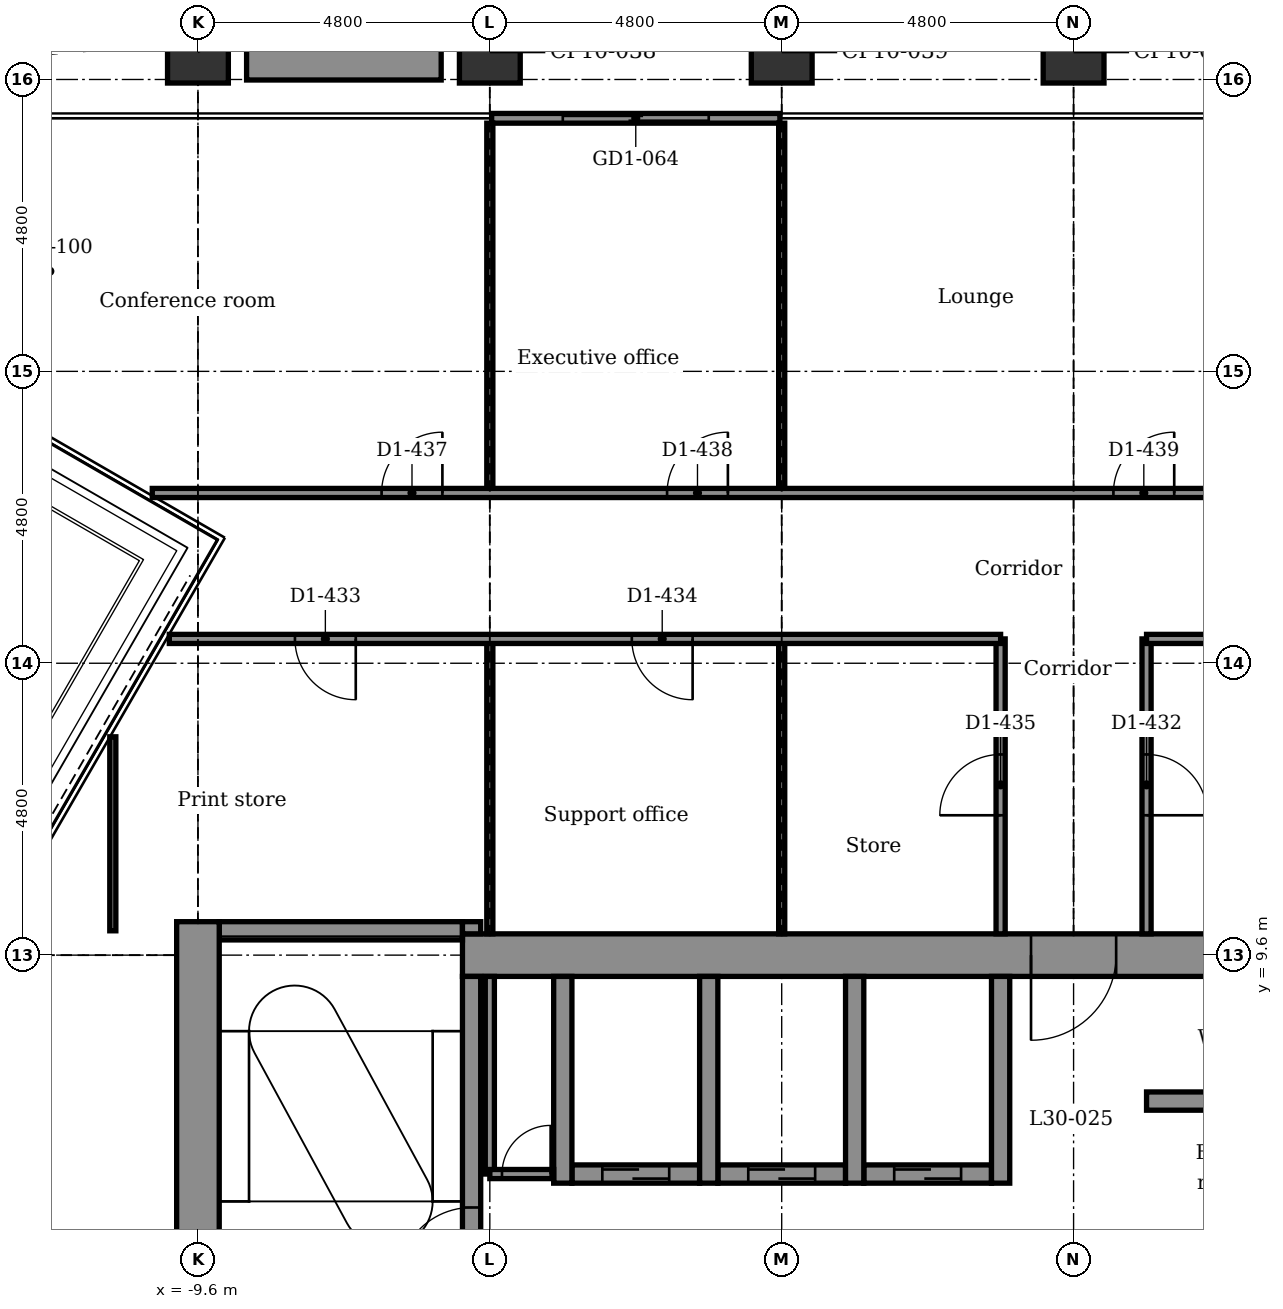
"""IFC4 building model, lengths in metres.
Left out: names, types, materials, properties, quantities, classifications, styles, units other than length and angle.
Written with IfcOpenShell. Run it as: python <this file> out.ifc"""

import sys

from ifc_helpers import new_model, si_unit, direction, frame, frame_2d, origin, origin_2d, place, context, subcontext, project, spatial, rectangle, extrude, element, fill, save


model = new_model("IFC4")
c1 = context("Model", 3, precision=1e-05, world=origin(), true_north=direction((0.0, 1.0)))
c2 = subcontext(c1, "Body", "Model", "MODEL_VIEW")
j1 = project(units=[si_unit("LENGTHUNIT", "METRE"), si_unit("PLANEANGLEUNIT", "RADIAN")], contexts=[c1])
p1 = place(None, origin())
s1 = spatial("IfcSite", under=j1, at=p1, CompositionType="ELEMENT")
p2 = place(p1, origin())
s2 = spatial("IfcBuilding", under=s1, at=p2, CompositionType="ELEMENT")
p3 = place(p2, frame((0.0, 0.0, 150.5)))
s3 = spatial("IfcBuildingStorey", under=s2, at=p3, CompositionType="ELEMENT", Elevation=150.5)
for number, where, z_axis, x_axis in (
    (1, (-9.6, 24.442, -0.15), (0.0, 0.0, 1.0), (1.0, 0.0, 0.0)),
    (2, (-4.8, 24.442, -0.15), (0.0, 0.0, 1.0), (1.0, 0.0, 0.0)),
    (3, (0.0, 24.442, -0.15), (0.0, 0.0, 1.0), (1.0, 0.0, 0.0)),
    (4, (4.8, 24.442, -0.15), (0.0, 0.0, 1.0), (1.0, 0.0, 0.0)),
):
    element("IfcColumn", number, at=place(p3, frame(where, z_axis=z_axis, x_axis=x_axis)), inside=s3, PredefinedType="COLUMN", context=c2, shape_type="SweptSolid", body=[
        extrude(rectangle(XDim=1.0, YDim=1.0, at=origin_2d()), origin(), (0.0, 0.0, 1.0), 3.9),
    ])
p4 = place(p3, frame((-3.45, 6.0, -0.15), z_axis=(0.0, 0.0, 1.0), x_axis=(1.0, 0.0, 0.0)))
e5 = element("IfcWall", 5, at=p4, inside=s3, PredefinedType="STANDARD", context=c2, shape_type="SweptSolid", body=[
    extrude(rectangle(XDim=2.1, YDim=0.3, at=frame_2d((1.05, 0.0))), origin(), (0.0, 0.0, 1.0), 3.9),
])
p5 = place(p4, frame((0.5, 0.0, 0.15)))
e6 = element("IfcOpeningElement", 6, at=p5, cuts=e5, PredefinedType="OPENING", context=c2, shape_type="SweptSolid", body=[
    extrude(rectangle(XDim=1.1, YDim=2.1, at=frame_2d((0.55, 1.05))), frame((0.0, 0.16, 0.0), z_axis=(0.0, -1.0, 0.0), x_axis=(1.0, 0.0, 0.0)), (0.0, 0.0, 1.0), 0.32),
])
p6 = place(p3, frame((-1.05, 6.0, -0.15), z_axis=(0.0, 0.0, 1.0), x_axis=(1.0, 0.0, 0.0)))
e7 = element("IfcWall", 7, at=p6, inside=s3, PredefinedType="STANDARD", context=c2, shape_type="SweptSolid", body=[
    extrude(rectangle(XDim=2.1, YDim=0.3, at=frame_2d((1.05, 0.0))), origin(), (0.0, 0.0, 1.0), 3.9),
])
p7 = place(p6, frame((0.5, 0.0, 0.15)))
e8 = element("IfcOpeningElement", 8, at=p7, cuts=e7, PredefinedType="OPENING", context=c2, shape_type="SweptSolid", body=[
    extrude(rectangle(XDim=1.1, YDim=2.1, at=frame_2d((0.55, 1.05))), frame((0.0, 0.16, 0.0), z_axis=(0.0, -1.0, 0.0), x_axis=(1.0, 0.0, 0.0)), (0.0, 0.0, 1.0), 0.32),
])
p8 = place(p3, frame((1.35, 6.0, -0.15), z_axis=(0.0, 0.0, 1.0), x_axis=(1.0, 0.0, 0.0)))
e9 = element("IfcWall", 9, at=p8, inside=s3, PredefinedType="STANDARD", context=c2, shape_type="SweptSolid", body=[
    extrude(rectangle(XDim=2.1, YDim=0.3, at=frame_2d((1.05, 0.0))), origin(), (0.0, 0.0, 1.0), 3.9),
])
p9 = place(p8, frame((0.5, 0.0, 0.15)))
e10 = element("IfcOpeningElement", 10, at=p9, cuts=e9, PredefinedType="OPENING", context=c2, shape_type="SweptSolid", body=[
    extrude(rectangle(XDim=1.1, YDim=2.1, at=frame_2d((0.55, 1.05))), frame((0.0, 0.16, 0.0), z_axis=(0.0, -1.0, 0.0), x_axis=(1.0, 0.0, 0.0)), (0.0, 0.0, 1.0), 0.32),
])
p10 = place(p3, frame((6.0, 7.2, -0.15), z_axis=(0.0, 0.0, 1.0), x_axis=(1.0, 0.0, 0.0)))
e11 = element("IfcWall", 11, at=p10, inside=s3, PredefinedType="STANDARD", context=c2, shape_type="SweptSolid", body=[
    extrude(rectangle(XDim=3.25, YDim=0.3, at=frame_2d((1.625, 0.0))), origin(), (0.0, 0.0, 1.0), 3.9),
])
p11 = place(p3, frame((-5.25, 9.6, -0.15), z_axis=(0.0, 0.0, 1.0), x_axis=(1.0, 0.0, 0.0)))
e12 = element("IfcWall", 12, at=p11, inside=s3, PredefinedType="SHEAR", context=c2, shape_type="SweptSolid", body=[
    extrude(rectangle(XDim=14.5, YDim=0.7, at=frame_2d((7.25, 0.0))), origin(), (0.0, 0.0, 1.0), 3.9),
])
p12 = place(p11, frame((9.35, 0.0, 0.15)))
e13 = element("IfcOpeningElement", 13, at=p12, cuts=e12, PredefinedType="OPENING", context=c2, shape_type="SweptSolid", body=[
    extrude(rectangle(XDim=1.4, YDim=2.1, at=frame_2d((0.7, 1.05))), frame((0.0, 0.36, 0.0), z_axis=(0.0, -1.0, 0.0), x_axis=(1.0, 0.0, 0.0)), (0.0, 0.0, 1.0), 0.72),
])
p13 = place(p3, frame((-9.25, 10.0, -0.15), z_axis=(0.0, 0.0, 1.0), x_axis=(1.0, 0.0, 0.0)))
e14 = element("IfcWall", 14, at=p13, inside=s3, PredefinedType="STANDARD", context=c2, shape_type="SweptSolid", body=[
    extrude(rectangle(XDim=4.0, YDim=0.3, at=frame_2d((2.0, 0.0))), origin(), (0.0, 0.0, 1.0), 3.9),
])
p14 = place(p3, frame((-9.6, 2.55, -0.15), z_axis=(0.0, 0.0, 1.0), x_axis=(0.0, 1.0, 0.0)))
e15 = element("IfcWall", 15, at=p14, inside=s3, PredefinedType="SHEAR", context=c2, shape_type="SweptSolid", body=[
    extrude(rectangle(XDim=7.6, YDim=0.7, at=frame_2d((3.8, 0.0))), origin(), (0.0, 0.0, 1.0), 3.9),
])
p15 = place(p3, frame((-5.1, 2.25, -0.15), z_axis=(0.0, 0.0, 1.0), x_axis=(0.0, 1.0, 0.0)))
e16 = element("IfcWall", 16, at=p15, inside=s3, PredefinedType="STANDARD", context=c2, shape_type="SweptSolid", body=[
    extrude(rectangle(XDim=7.0, YDim=0.3, at=frame_2d((3.5, 0.0))), origin(), (0.0, 0.0, 1.0), 3.9),
])
p16 = place(p15, frame((2.0, 0.0, 0.15)))
e17 = element("IfcOpeningElement", 17, at=p16, cuts=e16, PredefinedType="OPENING", context=c2, shape_type="SweptSolid", body=[
    extrude(rectangle(XDim=1.2, YDim=2.1, at=frame_2d((0.6, 1.05))), frame((0.0, 0.16, 0.0), z_axis=(0.0, -1.0, 0.0), x_axis=(1.0, 0.0, 0.0)), (0.0, 0.0, 1.0), 0.32),
])
p17 = place(p3, frame((-5.1, 9.95, -0.15), z_axis=(0.0, 0.0, 1.0), x_axis=(0.0, 1.0, 0.0)))
e18 = element("IfcWall", 18, at=p17, inside=s3, PredefinedType="STANDARD", context=c2, shape_type="SweptSolid", body=[
    extrude(rectangle(XDim=0.2, YDim=0.3, at=frame_2d((0.1, 0.0))), origin(), (0.0, 0.0, 1.0), 3.9),
])
for number, where, z_axis, x_axis in (
    (19, (-3.6, 5.85, -0.15), (0.0, 0.0, 1.0), (0.0, 1.0, 0.0)),
    (20, (-1.2, 5.85, -0.15), (0.0, 0.0, 1.0), (0.0, 1.0, 0.0)),
    (21, (1.2, 5.85, -0.15), (0.0, 0.0, 1.0), (0.0, 1.0, 0.0)),
    (22, (3.6, 5.85, -0.15), (0.0, 0.0, 1.0), (0.0, 1.0, 0.0)),
):
    element("IfcWall", number, at=place(p3, frame(where, z_axis=z_axis, x_axis=x_axis)), inside=s3, PredefinedType="STANDARD", context=c2, shape_type="SweptSolid", body=[
        extrude(rectangle(XDim=3.4, YDim=0.3, at=frame_2d((1.7, 0.0))), origin(), (0.0, 0.0, 1.0), 3.9),
    ])
p18 = place(p3, frame((-4.77, 23.362, 0.0), z_axis=(0.0, 0.0, 1.0), x_axis=(1.0, 0.0, 0.0)))
e23 = element("IfcWall", 23, at=p18, inside=s3, PredefinedType="PARTITIONING", context=c2, shape_type="SweptSolid", body=[
    extrude(rectangle(XDim=4.74, YDim=0.16, at=frame_2d((2.37, 0.0))), origin(), (0.0, 0.0, 1.0), 3.75),
])
p19 = place(p18, frame((1.17, 0.0, 0.0)))
e24 = element("IfcOpeningElement", 24, at=p19, cuts=e23, PredefinedType="OPENING", context=c2, shape_type="SweptSolid", body=[
    extrude(rectangle(XDim=2.4, YDim=2.4, at=frame_2d((1.2, 1.2))), frame((0.0, 0.09, 0.0), z_axis=(0.0, -1.0, 0.0), x_axis=(1.0, 0.0, 0.0)), (0.0, 0.0, 1.0), 0.18),
])
p20 = place(p3, frame((-8.8, 24.292, 0.0), z_axis=(0.0, 0.0, 1.0), x_axis=(1.0, 0.0, 0.0)))
e25 = element("IfcWall", 25, at=p20, inside=s3, PredefinedType="USERDEFINED", context=c2, shape_type="SweptSolid", body=[
    extrude(rectangle(XDim=3.2, YDim=0.6, at=frame_2d((1.6, 0.0))), origin(), (0.0, 0.0, 1.0), 0.7),
])
p21 = place(p3, frame((6.0, 9.95, 0.0), z_axis=(0.0, 0.0, 1.0), x_axis=(0.0, 1.0, 0.0)))
e26 = element("IfcWall", 26, at=p21, inside=s3, PredefinedType="PARTITIONING", context=c2, shape_type="SweptSolid", body=[
    extrude(rectangle(XDim=4.85, YDim=0.15, at=frame_2d((2.425, 0.0))), origin(), (0.0, 0.0, 1.0), 3.75),
])
p22 = place(p21, frame((1.95, 0.0, 0.0)))
e27 = element("IfcOpeningElement", 27, at=p22, cuts=e26, PredefinedType="OPENING", context=c2, shape_type="SweptSolid", body=[
    extrude(rectangle(XDim=1.0, YDim=2.1, at=frame_2d((0.5, 1.05))), frame((0.0, 0.085, 0.0), z_axis=(0.0, -1.0, 0.0), x_axis=(1.0, 0.0, 0.0)), (0.0, 0.0, 1.0), 0.17),
])
p23 = place(p3, frame((3.6, 9.95, 0.0), z_axis=(0.0, 0.0, 1.0), x_axis=(0.0, 1.0, 0.0)))
e28 = element("IfcWall", 28, at=p23, inside=s3, PredefinedType="PARTITIONING", context=c2, shape_type="SweptSolid", body=[
    extrude(rectangle(XDim=4.85, YDim=0.15, at=frame_2d((2.425, 0.0))), origin(), (0.0, 0.0, 1.0), 3.75),
])
p24 = place(p23, frame((1.95, 0.0, 0.0)))
e29 = element("IfcOpeningElement", 29, at=p24, cuts=e28, PredefinedType="OPENING", context=c2, shape_type="SweptSolid", body=[
    extrude(rectangle(XDim=1.0, YDim=2.1, at=frame_2d((0.5, 1.05))), frame((0.0, 0.085, 0.0), z_axis=(0.0, -1.0, 0.0), x_axis=(1.0, 0.0, 0.0)), (0.0, 0.0, 1.0), 0.17),
])
p25 = place(p3, frame((0.0, 9.95, 0.0), z_axis=(0.0, 0.0, 1.0), x_axis=(0.0, 1.0, 0.0)))
e30 = element("IfcWall", 30, at=p25, inside=s3, PredefinedType="PARTITIONING", context=c2, shape_type="SweptSolid", body=[
    extrude(rectangle(XDim=4.85, YDim=0.1, at=frame_2d((2.425, 0.0))), origin(), (0.0, 0.0, 1.0), 3.066),
])
p26 = place(p3, frame((0.0, 17.2, 0.0), z_axis=(0.0, 0.0, 1.0), x_axis=(0.0, 1.0, 0.0)))
e31 = element("IfcWall", 31, at=p26, inside=s3, PredefinedType="PARTITIONING", context=c2, shape_type="SweptSolid", body=[
    extrude(rectangle(XDim=6.082, YDim=0.1, at=frame_2d((3.041, 0.0))), origin(), (0.0, 0.0, 1.0), 3.066),
])
p27 = place(p3, frame((-4.8, 9.95, 0.0), z_axis=(0.0, 0.0, 1.0), x_axis=(0.0, 1.0, 0.0)))
e32 = element("IfcWall", 32, at=p27, inside=s3, PredefinedType="PARTITIONING", context=c2, shape_type="SweptSolid", body=[
    extrude(rectangle(XDim=4.85, YDim=0.1, at=frame_2d((2.425, 0.0))), origin(), (0.0, 0.0, 1.0), 3.066),
])
p28 = place(p3, frame((-4.8, 17.2, 0.0), z_axis=(0.0, 0.0, 1.0), x_axis=(0.0, 1.0, 0.0)))
e33 = element("IfcWall", 33, at=p28, inside=s3, PredefinedType="PARTITIONING", context=c2, shape_type="SweptSolid", body=[
    extrude(rectangle(XDim=6.082, YDim=0.1, at=frame_2d((3.041, 0.0))), origin(), (0.0, 0.0, 1.0), 3.066),
])
p29 = place(p3, frame((-4.8, 6.0, 0.0), z_axis=(0.0, 0.0, 1.0), x_axis=(0.0, 1.0, 0.0)))
e34 = element("IfcWall", 34, at=p29, inside=s3, PredefinedType="PARTITIONING", context=c2, shape_type="SweptSolid", body=[
    extrude(rectangle(XDim=3.25, YDim=0.15, at=frame_2d((1.625, 0.0))), origin(), (0.0, 0.0, 1.0), 3.75),
])
p30 = place(p3, frame((-11.0, 10.0, 0.0), z_axis=(0.0, 0.0, 1.0), x_axis=(0.0, 1.0, 0.0)))
e35 = element("IfcWall", 35, at=p30, inside=s3, PredefinedType="PARTITIONING", context=c2, shape_type="SweptSolid", body=[
    extrude(rectangle(XDim=3.19, YDim=0.1, at=frame_2d((1.595, 0.0))), origin(), (0.0, 0.0, 1.0), 3.75),
])
p31 = place(p3, frame((-4.8, 6.0, 0.0), z_axis=(0.0, 0.0, 1.0), x_axis=(1.0, 0.0, 0.0)))
e36 = element("IfcWall", 36, at=p31, inside=s3, PredefinedType="PARTITIONING", context=c2, shape_type="SweptSolid", body=[
    extrude(rectangle(XDim=1.05, YDim=0.15, at=frame_2d((0.525, 0.0))), origin(), (0.0, 0.0, 1.0), 3.75),
])
p32 = place(p31, frame((0.2, 0.0, 0.0)))
e37 = element("IfcOpeningElement", 37, at=p32, cuts=e36, PredefinedType="OPENING", context=c2, shape_type="SweptSolid", body=[
    extrude(rectangle(XDim=0.8, YDim=2.1, at=frame_2d((0.4, 1.05))), frame((0.0, 0.085, 0.0), z_axis=(0.0, -1.0, 0.0), x_axis=(1.0, 0.0, 0.0)), (0.0, 0.0, 1.0), 0.17),
])
p33 = place(p3, frame((-10.071, 14.8, 0.0), z_axis=(0.0, 0.0, 1.0), x_axis=(1.0, 0.0, 0.0)))
e38 = element("IfcWall", 38, at=p33, inside=s3, PredefinedType="PARTITIONING", context=c2, shape_type="SweptSolid", body=[
    extrude(rectangle(XDim=13.671, YDim=0.15, at=frame_2d((6.835, 0.0))), origin(), (0.0, 0.0, 1.0), 3.75),
])
p34 = place(p33, frame((2.066, 0.0, 0.0)))
e39 = element("IfcOpeningElement", 39, at=p34, cuts=e38, PredefinedType="OPENING", context=c2, shape_type="SweptSolid", body=[
    extrude(rectangle(XDim=1.0, YDim=2.1, at=frame_2d((0.5, 1.05))), frame((0.0, 0.085, 0.0), z_axis=(0.0, -1.0, 0.0), x_axis=(1.0, 0.0, 0.0)), (0.0, 0.0, 1.0), 0.17),
])
p35 = place(p33, frame((7.606, 0.0, 0.0)))
e40 = element("IfcOpeningElement", 40, at=p35, cuts=e38, PredefinedType="OPENING", context=c2, shape_type="SweptSolid", body=[
    extrude(rectangle(XDim=1.0, YDim=2.1, at=frame_2d((0.5, 1.05))), frame((0.0, 0.085, 0.0), z_axis=(0.0, -1.0, 0.0), x_axis=(1.0, 0.0, 0.0)), (0.0, 0.0, 1.0), 0.17),
])
p36 = place(p3, frame((6.0, 14.8, 0.0), z_axis=(0.0, 0.0, 1.0), x_axis=(1.0, 0.0, 0.0)))
e41 = element("IfcWall", 41, at=p36, inside=s3, PredefinedType="PARTITIONING", context=c2, shape_type="SweptSolid", body=[
    extrude(rectangle(XDim=10.905, YDim=0.15, at=frame_2d((5.453, 0.0))), origin(), (0.0, 0.0, 1.0), 3.75),
])
p37 = place(p36, frame((4.485, 0.0, 0.0)))
e42 = element("IfcOpeningElement", 42, at=p37, cuts=e41, PredefinedType="OPENING", context=c2, shape_type="SweptSolid", body=[
    extrude(rectangle(XDim=1.0, YDim=2.1, at=frame_2d((0.5, 1.05))), frame((0.0, 0.085, 0.0), z_axis=(0.0, -1.0, 0.0), x_axis=(1.0, 0.0, 0.0)), (0.0, 0.0, 1.0), 0.17),
])
p38 = place(p3, frame((-10.351, 17.2, 0.0), z_axis=(0.0, 0.0, 1.0), x_axis=(1.0, 0.0, 0.0)))
e43 = element("IfcWall", 43, at=p38, inside=s3, PredefinedType="PARTITIONING", context=c2, shape_type="SweptSolid", body=[
    extrude(rectangle(XDim=27.35, YDim=0.15, at=frame_2d((13.675, 0.0))), origin(), (0.0, 0.0, 1.0), 3.75),
])
p39 = place(p38, frame((3.771, 0.0, 0.0)))
e44 = element("IfcOpeningElement", 44, at=p39, cuts=e43, PredefinedType="OPENING", context=c2, shape_type="SweptSolid", body=[
    extrude(rectangle(XDim=1.0, YDim=2.1, at=frame_2d((0.5, 1.05))), frame((0.0, 0.085, 0.0), z_axis=(0.0, -1.0, 0.0), x_axis=(1.0, 0.0, 0.0)), (0.0, 0.0, 1.0), 0.17),
])
p40 = place(p38, frame((8.466, 0.0, 0.0)))
e45 = element("IfcOpeningElement", 45, at=p40, cuts=e43, PredefinedType="OPENING", context=c2, shape_type="SweptSolid", body=[
    extrude(rectangle(XDim=1.0, YDim=2.1, at=frame_2d((0.5, 1.05))), frame((0.0, 0.085, 0.0), z_axis=(0.0, -1.0, 0.0), x_axis=(1.0, 0.0, 0.0)), (0.0, 0.0, 1.0), 0.17),
])
p41 = place(p38, frame((15.806, 0.0, 0.0)))
e46 = element("IfcOpeningElement", 46, at=p41, cuts=e43, PredefinedType="OPENING", context=c2, shape_type="SweptSolid", body=[
    extrude(rectangle(XDim=1.0, YDim=2.1, at=frame_2d((0.5, 1.05))), frame((0.0, 0.085, 0.0), z_axis=(0.0, -1.0, 0.0), x_axis=(1.0, 0.0, 0.0)), (0.0, 0.0, 1.0), 0.17),
])
p42 = place(p38, frame((23.22, 0.0, 0.0)))
e47 = element("IfcOpeningElement", 47, at=p42, cuts=e43, PredefinedType="OPENING", context=c2, shape_type="SweptSolid", body=[
    extrude(rectangle(XDim=1.0, YDim=2.1, at=frame_2d((0.5, 1.05))), frame((0.0, 0.085, 0.0), z_axis=(0.0, -1.0, 0.0), x_axis=(1.0, 0.0, 0.0)), (0.0, 0.0, 1.0), 0.17),
])
p43 = place(p19, origin())
e48 = element("IfcDoor", 48, at=p43, inside=s3, OperationType="DOUBLE_DOOR_SLIDING", PredefinedType="DOOR", context=c2, shape_type="SweptSolid", body=[
    extrude(rectangle(XDim=2.4, YDim=2.4, at=frame_2d((1.2, 1.2))), frame((0.0, 0.025, 0.0), z_axis=(0.0, -1.0, 0.0), x_axis=(1.0, 0.0, 0.0)), (0.0, 0.0, 1.0), 0.05),
])
fill(e24, e48)
p44 = place(p32, origin())
e49 = element("IfcDoor", 49, at=p44, inside=s3, OperationType="SINGLE_SWING_RIGHT", PredefinedType="DOOR", context=c2, shape_type="SweptSolid", body=[
    extrude(rectangle(XDim=0.8, YDim=2.1, at=frame_2d((0.4, 1.05))), frame((0.0, 0.025, 0.0), z_axis=(0.0, -1.0, 0.0), x_axis=(1.0, 0.0, 0.0)), (0.0, 0.0, 1.0), 0.05),
])
fill(e37, e49)
p45 = place(p22, frame((1.0, 0.0, 0.0), z_axis=(0.0, 0.0, 1.0), x_axis=(-1.0, 0.0, 0.0)))
e50 = element("IfcDoor", 50, at=p45, inside=s3, OperationType="SINGLE_SWING_LEFT", PredefinedType="DOOR", context=c2, shape_type="SweptSolid", body=[
    extrude(rectangle(XDim=1.0, YDim=2.1, at=frame_2d((0.5, 1.05))), frame((0.0, 0.025, 0.0), z_axis=(0.0, -1.0, 0.0), x_axis=(1.0, 0.0, 0.0)), (0.0, 0.0, 1.0), 0.05),
])
fill(e27, e50)
p46 = place(p34, frame((1.0, 0.0, 0.0), z_axis=(0.0, 0.0, 1.0), x_axis=(-1.0, 0.0, 0.0)))
e51 = element("IfcDoor", 51, at=p46, inside=s3, OperationType="SINGLE_SWING_RIGHT", PredefinedType="DOOR", context=c2, shape_type="SweptSolid", body=[
    extrude(rectangle(XDim=1.0, YDim=2.1, at=frame_2d((0.5, 1.05))), frame((0.0, 0.025, 0.0), z_axis=(0.0, -1.0, 0.0), x_axis=(1.0, 0.0, 0.0)), (0.0, 0.0, 1.0), 0.05),
])
fill(e39, e51)
p47 = place(p35, frame((1.0, 0.0, 0.0), z_axis=(0.0, 0.0, 1.0), x_axis=(-1.0, 0.0, 0.0)))
e52 = element("IfcDoor", 52, at=p47, inside=s3, OperationType="SINGLE_SWING_RIGHT", PredefinedType="DOOR", context=c2, shape_type="SweptSolid", body=[
    extrude(rectangle(XDim=1.0, YDim=2.1, at=frame_2d((0.5, 1.05))), frame((0.0, 0.025, 0.0), z_axis=(0.0, -1.0, 0.0), x_axis=(1.0, 0.0, 0.0)), (0.0, 0.0, 1.0), 0.05),
])
fill(e40, e52)
p48 = place(p24, origin())
e53 = element("IfcDoor", 53, at=p48, inside=s3, OperationType="SINGLE_SWING_LEFT", PredefinedType="DOOR", context=c2, shape_type="SweptSolid", body=[
    extrude(rectangle(XDim=1.0, YDim=2.1, at=frame_2d((0.5, 1.05))), frame((0.0, 0.025, 0.0), z_axis=(0.0, -1.0, 0.0), x_axis=(1.0, 0.0, 0.0)), (0.0, 0.0, 1.0), 0.05),
])
fill(e29, e53)
p49 = place(p39, origin())
e54 = element("IfcDoor", 54, at=p49, inside=s3, OperationType="SINGLE_SWING_RIGHT", PredefinedType="DOOR", context=c2, shape_type="SweptSolid", body=[
    extrude(rectangle(XDim=1.0, YDim=2.1, at=frame_2d((0.5, 1.05))), frame((0.0, 0.025, 0.0), z_axis=(0.0, -1.0, 0.0), x_axis=(1.0, 0.0, 0.0)), (0.0, 0.0, 1.0), 0.05),
])
fill(e44, e54)
p50 = place(p40, origin())
e55 = element("IfcDoor", 55, at=p50, inside=s3, OperationType="SINGLE_SWING_RIGHT", PredefinedType="DOOR", context=c2, shape_type="SweptSolid", body=[
    extrude(rectangle(XDim=1.0, YDim=2.1, at=frame_2d((0.5, 1.05))), frame((0.0, 0.025, 0.0), z_axis=(0.0, -1.0, 0.0), x_axis=(1.0, 0.0, 0.0)), (0.0, 0.0, 1.0), 0.05),
])
fill(e45, e55)
p51 = place(p41, origin())
e56 = element("IfcDoor", 56, at=p51, inside=s3, OperationType="SINGLE_SWING_RIGHT", PredefinedType="DOOR", context=c2, shape_type="SweptSolid", body=[
    extrude(rectangle(XDim=1.0, YDim=2.1, at=frame_2d((0.5, 1.05))), frame((0.0, 0.025, 0.0), z_axis=(0.0, -1.0, 0.0), x_axis=(1.0, 0.0, 0.0)), (0.0, 0.0, 1.0), 0.05),
])
fill(e46, e56)
p52 = place(p5, origin())
e57 = element("IfcDoor", 57, at=p52, inside=s3, OperationType="DOUBLE_DOOR_SLIDING", PredefinedType="DOOR", context=c2, shape_type="SweptSolid", body=[
    extrude(rectangle(XDim=1.1, YDim=2.1, at=frame_2d((0.55, 1.05))), frame((0.0, 0.025, 0.0), z_axis=(0.0, -1.0, 0.0), x_axis=(1.0, 0.0, 0.0)), (0.0, 0.0, 1.0), 0.05),
])
fill(e6, e57)
p53 = place(p7, origin())
e58 = element("IfcDoor", 58, at=p53, inside=s3, OperationType="DOUBLE_DOOR_SLIDING", PredefinedType="DOOR", context=c2, shape_type="SweptSolid", body=[
    extrude(rectangle(XDim=1.1, YDim=2.1, at=frame_2d((0.55, 1.05))), frame((0.0, 0.025, 0.0), z_axis=(0.0, -1.0, 0.0), x_axis=(1.0, 0.0, 0.0)), (0.0, 0.0, 1.0), 0.05),
])
fill(e8, e58)
p54 = place(p9, origin())
e59 = element("IfcDoor", 59, at=p54, inside=s3, OperationType="DOUBLE_DOOR_SLIDING", PredefinedType="DOOR", context=c2, shape_type="SweptSolid", body=[
    extrude(rectangle(XDim=1.1, YDim=2.1, at=frame_2d((0.55, 1.05))), frame((0.0, 0.025, 0.0), z_axis=(0.0, -1.0, 0.0), x_axis=(1.0, 0.0, 0.0)), (0.0, 0.0, 1.0), 0.05),
])
fill(e10, e59)
p55 = place(p16, origin())
e60 = element("IfcDoor", 60, at=p55, inside=s3, OperationType="SINGLE_SWING_LEFT", PredefinedType="DOOR", context=c2, shape_type="SweptSolid", body=[
    extrude(rectangle(XDim=1.2, YDim=2.1, at=frame_2d((0.6, 1.05))), frame((0.0, 0.025, 0.0), z_axis=(0.0, -1.0, 0.0), x_axis=(1.0, 0.0, 0.0)), (0.0, 0.0, 1.0), 0.05),
])
fill(e17, e60)
p56 = place(p12, frame((1.4, 0.0, 0.0), z_axis=(0.0, 0.0, 1.0), x_axis=(-1.0, 0.0, 0.0)))
e61 = element("IfcDoor", 61, at=p56, inside=s3, OperationType="SINGLE_SWING_LEFT", PredefinedType="DOOR", context=c2, shape_type="SweptSolid", body=[
    extrude(rectangle(XDim=1.4, YDim=2.1, at=frame_2d((0.7, 1.05))), frame((0.0, 0.025, 0.0), z_axis=(0.0, -1.0, 0.0), x_axis=(1.0, 0.0, 0.0)), (0.0, 0.0, 1.0), 0.05),
])
fill(e13, e61)
save(model, sys.argv[1])
